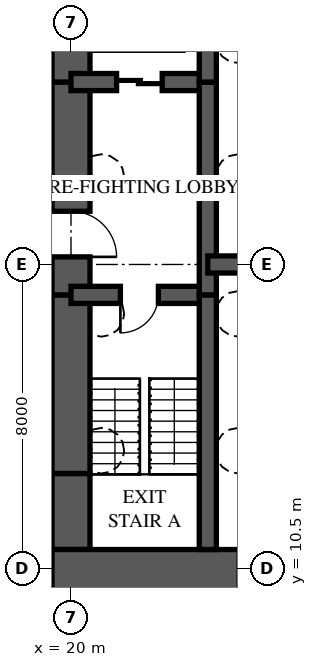
"""IFC4 building model, lengths in metres.
Left out: names, types, materials, properties, quantities, classifications, styles, units other than length and angle.
Written with IfcOpenShell. Run it as: python <this file> out.ifc"""

import sys

from ifc_helpers import new_model, si_unit, direction, frame, frame_2d, origin, place, context, subcontext, project, spatial, rectangle, extrude, element, fill, save


model = new_model("IFC4")
c1 = context("Model", 3, precision=1e-05, world=origin(), true_north=direction((0.0, 1.0)))
c2 = subcontext(c1, "Body", "Model", "MODEL_VIEW")
j1 = project(units=[si_unit("LENGTHUNIT", "METRE"), si_unit("PLANEANGLEUNIT", "RADIAN")], contexts=[c1])
p1 = place(None, origin())
s1 = spatial("IfcSite", under=j1, at=p1, CompositionType="ELEMENT")
p2 = place(p1, origin())
s2 = spatial("IfcBuilding", under=s1, at=p2, CompositionType="ELEMENT")
p3 = place(p2, frame((0.0, 0.0, -7.5)))
s3 = spatial("IfcBuildingStorey", under=s2, at=p3, CompositionType="ELEMENT", Elevation=-7.5)
p4 = place(p3, frame((19.5, 10.125, 0.0), z_axis=(0.0, 0.0, 1.0), x_axis=(1.0, 0.0, 0.0)))
e1 = element("IfcWall", 1, at=p4, inside=s3, PredefinedType="SHEAR", context=c2, shape_type="SweptSolid", body=[
    extrude(rectangle(XDim=6.5, YDim=1.75, at=frame_2d((3.25, 0.0))), origin(), (0.0, 0.0, 1.0), 3.5),
])
p5 = place(p4, frame((4.925, 0.0, 0.0)))
e2 = element("IfcOpeningElement", 2, at=p5, cuts=e1, PredefinedType="OPENING", context=c2, shape_type="SweptSolid", body=[
    extrude(rectangle(XDim=0.75, YDim=2.1, at=frame_2d((0.375, 1.05))), frame((0.0, 0.885, 0.0), z_axis=(0.0, -1.0, 0.0), x_axis=(1.0, 0.0, 0.0)), (0.0, 0.0, 1.0), 1.77),
])
p6 = place(p3, frame((20.0, 26.0, 0.0), z_axis=(0.0, 0.0, 1.0), x_axis=(0.0, -1.0, 0.0)))
e3 = element("IfcWall", 3, at=p6, inside=s3, PredefinedType="SHEAR", context=c2, shape_type="SweptSolid", body=[
    extrude(rectangle(XDim=2.7, YDim=1.0, at=frame_2d((1.35, 0.0))), origin(), (0.0, 0.0, 1.0), 3.5),
])
p7 = place(p3, frame((20.0, 23.3, 0.0), z_axis=(0.0, 0.0, 1.0), x_axis=(0.0, -1.0, 0.0)))
e4 = element("IfcWall", 4, at=p7, inside=s3, PredefinedType="SHEAR", context=c2, shape_type="SweptSolid", body=[
    extrude(rectangle(XDim=5.6, YDim=1.0, at=frame_2d((2.8, 0.0))), origin(), (0.0, 0.0, 1.0), 3.5),
])
p8 = place(p7, frame((3.4, 0.0, 0.0)))
e5 = element("IfcOpeningElement", 5, at=p8, cuts=e4, PredefinedType="OPENING", context=c2, shape_type="SweptSolid", body=[
    extrude(rectangle(XDim=1.2, YDim=2.2, at=frame_2d((0.6, 1.1))), frame((0.0, 0.51, 0.0), z_axis=(0.0, -1.0, 0.0), x_axis=(1.0, 0.0, 0.0)), (0.0, 0.0, 1.0), 1.02),
])
p9 = place(p3, frame((20.0, 17.7, 0.0), z_axis=(0.0, 0.0, 1.0), x_axis=(0.0, -1.0, 0.0)))
e6 = element("IfcWall", 6, at=p9, inside=s3, PredefinedType="SHEAR", context=c2, shape_type="SweptSolid", body=[
    extrude(rectangle(XDim=4.7, YDim=1.0, at=frame_2d((2.35, 0.0))), origin(), (0.0, 0.0, 1.0), 3.5),
])
p10 = place(p3, frame((20.0, 13.0, 0.0), z_axis=(0.0, 0.0, 1.0), x_axis=(0.0, -1.0, 0.0)))
e7 = element("IfcWall", 7, at=p10, inside=s3, PredefinedType="SHEAR", context=c2, shape_type="SweptSolid", body=[
    extrude(rectangle(XDim=2.0, YDim=1.0, at=frame_2d((1.0, 0.0))), origin(), (0.0, 0.0, 1.0), 3.5),
])
p11 = place(p3, frame((23.6, 11.0, 0.0), z_axis=(0.0, 0.0, 1.0), x_axis=(0.0, 1.0, 0.0)))
e8 = element("IfcWall", 8, at=p11, inside=s3, PredefinedType="SHEAR", context=c2, shape_type="SweptSolid", body=[
    extrude(rectangle(XDim=6.7, YDim=0.45, at=frame_2d((3.35, 0.0))), origin(), (0.0, 0.0, 1.0), 3.5),
])
p12 = place(p3, frame((23.6, 17.7, 0.0), z_axis=(0.0, 0.0, 1.0), x_axis=(0.0, 1.0, 0.0)))
e9 = element("IfcWall", 9, at=p12, inside=s3, PredefinedType="SHEAR", context=c2, shape_type="SweptSolid", body=[
    extrude(rectangle(XDim=5.6, YDim=0.45, at=frame_2d((2.8, 0.0))), origin(), (0.0, 0.0, 1.0), 3.5),
])
p13 = place(p3, frame((23.6, 23.3, 0.0), z_axis=(0.0, 0.0, 1.0), x_axis=(0.0, 1.0, 0.0)))
e10 = element("IfcWall", 10, at=p13, inside=s3, PredefinedType="SHEAR", context=c2, shape_type="SweptSolid", body=[
    extrude(rectangle(XDim=2.7, YDim=0.45, at=frame_2d((1.35, 0.0))), origin(), (0.0, 0.0, 1.0), 3.5),
])
p14 = place(p3, frame((20.0, 17.7, 0.0), z_axis=(0.0, 0.0, 1.0), x_axis=(1.0, 0.0, 0.0)))
e11 = element("IfcWall", 11, at=p14, inside=s3, PredefinedType="SHEAR", context=c2, shape_type="SweptSolid", body=[
    extrude(rectangle(XDim=3.6, YDim=0.45, at=frame_2d((1.8, 0.0))), origin(), (0.0, 0.0, 1.0), 3.5),
])
p15 = place(p14, frame((1.3, 0.0, 0.0)))
e12 = element("IfcOpeningElement", 12, at=p15, cuts=e11, PredefinedType="OPENING", context=c2, shape_type="SweptSolid", body=[
    extrude(rectangle(XDim=1.0, YDim=2.1, at=frame_2d((0.5, 1.05))), frame((0.0, 0.235, 0.0), z_axis=(0.0, -1.0, 0.0), x_axis=(1.0, 0.0, 0.0)), (0.0, 0.0, 1.0), 0.47),
])
p16 = place(p3, frame((20.0, 23.3, 0.0), z_axis=(0.0, 0.0, 1.0), x_axis=(1.0, 0.0, 0.0)))
e13 = element("IfcWall", 13, at=p16, inside=s3, PredefinedType="SHEAR", context=c2, shape_type="SweptSolid", body=[
    extrude(rectangle(XDim=3.6, YDim=0.45, at=frame_2d((1.8, 0.0))), origin(), (0.0, 0.0, 1.0), 3.5),
])
p17 = place(p16, frame((1.2, 0.0, 0.0)))
e14 = element("IfcOpeningElement", 14, at=p17, cuts=e13, PredefinedType="OPENING", context=c2, shape_type="SweptSolid", body=[
    extrude(rectangle(XDim=1.2, YDim=2.1, at=frame_2d((0.6, 1.05))), frame((0.0, 0.235, 0.0), z_axis=(0.0, -1.0, 0.0), x_axis=(1.0, 0.0, 0.0)), (0.0, 0.0, 1.0), 0.47),
])
p18 = place(p3, frame((23.6, 18.5, 0.0), z_axis=(0.0, 0.0, 1.0), x_axis=(1.0, 0.0, 0.0)))
e15 = element("IfcWall", 15, at=p18, inside=s3, PredefinedType="SHEAR", context=c2, shape_type="SweptSolid", body=[
    extrude(rectangle(XDim=2.4, YDim=0.45, at=frame_2d((1.2, 0.0))), origin(), (0.0, 0.0, 1.0), 3.5),
])
p19 = place(p15, frame((1.0, 0.0, 0.0), z_axis=(0.0, 0.0, 1.0), x_axis=(-1.0, 0.0, 0.0)))
e16 = element("IfcDoor", 16, at=p19, inside=s3, OperationType="SINGLE_SWING_RIGHT", PredefinedType="DOOR", context=c2, shape_type="SweptSolid", body=[
    extrude(rectangle(XDim=1.0, YDim=2.1, at=frame_2d((0.5, 1.05))), frame((0.0, 0.025, 0.0), z_axis=(0.0, -1.0, 0.0), x_axis=(1.0, 0.0, 0.0)), (0.0, 0.0, 1.0), 0.05),
])
fill(e12, e16)
p20 = place(p8, origin())
e17 = element("IfcDoor", 17, at=p20, inside=s3, OperationType="SINGLE_SWING_RIGHT", PredefinedType="DOOR", context=c2, shape_type="SweptSolid", body=[
    extrude(rectangle(XDim=1.2, YDim=2.2, at=frame_2d((0.6, 1.1))), frame((0.0, 0.025, 0.0), z_axis=(0.0, -1.0, 0.0), x_axis=(1.0, 0.0, 0.0)), (0.0, 0.0, 1.0), 0.05),
])
fill(e5, e17)
p21 = place(p17, origin())
e18 = element("IfcDoor", 18, at=p21, inside=s3, OperationType="SLIDING_TO_LEFT", PredefinedType="DOOR", context=c2, shape_type="SweptSolid", body=[
    extrude(rectangle(XDim=1.2, YDim=2.1, at=frame_2d((0.6, 1.05))), frame((0.0, 0.025, 0.0), z_axis=(0.0, -1.0, 0.0), x_axis=(1.0, 0.0, 0.0)), (0.0, 0.0, 1.0), 0.05),
])
fill(e14, e18)
save(model, sys.argv[1])
